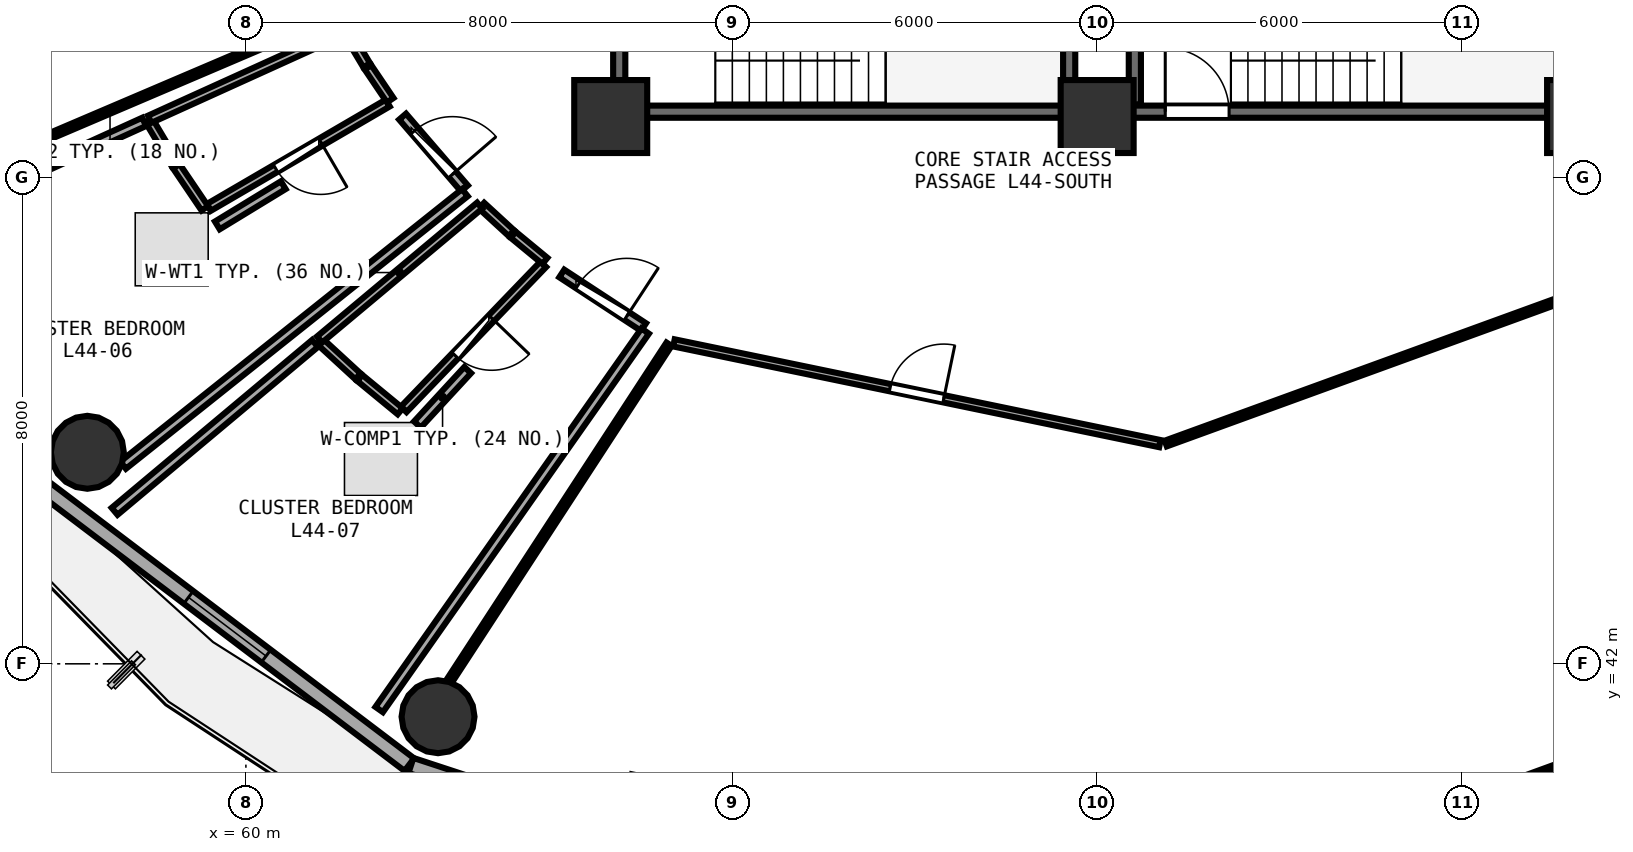
"""IFC4 building model, lengths in metres.
Left out: names, types, materials, properties, quantities, classifications, styles, units other than length and angle.
Written with IfcOpenShell. Run it as: python <this file> out.ifc"""

import sys

from ifc_helpers import new_model, si_unit, direction, frame, frame_2d, origin, origin_2d, place, context, subcontext, project, spatial, rectangle, circle, extrude, element, fill, save


model = new_model("IFC4")
c1 = context("Model", 3, precision=1e-05, world=origin(), true_north=direction((0.0, 1.0)))
c2 = subcontext(c1, "Body", "Model", "MODEL_VIEW")
j1 = project(units=[si_unit("LENGTHUNIT", "METRE"), si_unit("PLANEANGLEUNIT", "RADIAN")], contexts=[c1])
p1 = place(None, origin())
s1 = spatial("IfcSite", under=j1, at=p1, CompositionType="ELEMENT")
p2 = place(p1, origin())
s2 = spatial("IfcBuilding", under=s1, at=p2, CompositionType="ELEMENT")
p3 = place(p2, frame((0.0, 0.0, 173.1)))
s3 = spatial("IfcBuildingStorey", under=s2, at=p3, CompositionType="ELEMENT", Elevation=173.1)
for number, where, z_axis, x_axis in (
    (1, (66.0, 51.0, 0.0), (0.0, 0.0, 1.0), (1.0, 0.0, 0.0)),
    (2, (74.0, 51.0, 0.0), (0.0, 0.0, 1.0), (1.0, 0.0, 0.0)),
    (3, (82.0, 51.0, 0.0), (0.0, 0.0, 1.0), (1.0, 0.0, 0.0)),
):
    element("IfcColumn", number, at=place(p3, frame(where, z_axis=z_axis, x_axis=x_axis)), inside=s3, PredefinedType="PILASTER", context=c2, shape_type="SweptSolid", body=[
        extrude(rectangle(XDim=1.2, YDim=1.2, at=origin_2d()), origin(), (0.0, 0.0, 1.0), 3.75),
    ])
for number, where, z_axis, x_axis in (
    (4, (57.392, 45.479, 0.0), (0.0, 0.0, 1.0), (1.0, 0.0, 0.0)),
    (5, (63.16, 41.13, 0.0), (0.0, 0.0, 1.0), (1.0, 0.0, 0.0)),
):
    element("IfcColumn", number, at=place(p3, frame(where, z_axis=z_axis, x_axis=x_axis)), inside=s3, PredefinedType="COLUMN", context=c2, shape_type="SweptSolid", body=[
        extrude(circle(Radius=0.6, at=origin_2d()), origin(), (0.0, 0.0, 1.0), 3.75),
    ])
p4 = place(p3, frame((56.699, 44.878, 0.0), z_axis=(0.0, 0.0, 1.0), x_axis=(0.797163719609, -0.603763202042, 0.0)))
e6 = element("IfcWall", 6, at=p4, inside=s3, PredefinedType="SOLIDWALL", context=c2, shape_type="SweptSolid", body=[
    extrude(rectangle(XDim=7.512, YDim=0.26, at=frame_2d((3.756, 0.0))), origin(), (0.0, 0.0, 1.0), 3.475),
])
p5 = place(p4, frame((2.956, 0.0, 0.85)))
e7 = element("IfcOpeningElement", 7, at=p5, cuts=e6, PredefinedType="OPENING", context=c2, shape_type="SweptSolid", body=[
    extrude(rectangle(XDim=1.6, YDim=1.45, at=frame_2d((0.8, 0.725))), frame((0.0, 0.14, 0.0), z_axis=(0.0, -1.0, 0.0), x_axis=(1.0, 0.0, 0.0)), (0.0, 0.0, 1.0), 0.28),
])
p6 = place(p3, frame((62.714, 40.328, 0.0), z_axis=(0.0, 0.0, 1.0), x_axis=(0.950038302428, -0.312133343173, 0.0)))
e8 = element("IfcWall", 8, at=p6, inside=s3, PredefinedType="SOLIDWALL", context=c2, shape_type="SweptSolid", body=[
    extrude(rectangle(XDim=7.733, YDim=0.26, at=frame_2d((3.867, 0.0))), origin(), (0.0, 0.0, 1.0), 3.475),
])
p7 = place(p6, frame((3.067, 0.0, 0.85)))
e9 = element("IfcOpeningElement", 9, at=p7, cuts=e8, PredefinedType="OPENING", context=c2, shape_type="SweptSolid", body=[
    extrude(rectangle(XDim=1.6, YDim=1.45, at=frame_2d((0.8, 0.725))), frame((0.0, 0.14, 0.0), z_axis=(0.0, -1.0, 0.0), x_axis=(1.0, 0.0, 0.0)), (0.0, 0.0, 1.0), 0.28),
])
p8 = place(p3, frame((74.0, 51.08, 0.0), z_axis=(0.0, 0.0, 1.0), x_axis=(1.0, 0.0, 0.0)))
e10 = element("IfcWall", 10, at=p8, inside=s3, PredefinedType="SHEAR", context=c2, shape_type="SweptSolid", body=[
    extrude(rectangle(XDim=7.9, YDim=0.2, at=frame_2d((3.95, 0.0))), origin(), (0.0, 0.0, 1.0), 3.49),
])
p9 = place(p8, frame((1.12, 0.0, 0.0)))
e11 = element("IfcOpeningElement", 11, at=p9, cuts=e10, PredefinedType="OPENING", context=c2, shape_type="SweptSolid", body=[
    extrude(rectangle(XDim=1.05, YDim=2.1, at=frame_2d((0.525, 1.05))), frame((0.0, 0.11, 0.0), z_axis=(0.0, -1.0, 0.0), x_axis=(1.0, 0.0, 0.0)), (0.0, 0.0, 1.0), 0.22),
])
p10 = place(p3, frame((74.62, 54.27, 0.0), z_axis=(0.0, 0.0, 1.0), x_axis=(0.0, -1.0, 0.0)))
e12 = element("IfcWall", 12, at=p10, inside=s3, PredefinedType="SHEAR", context=c2, shape_type="SweptSolid", body=[
    extrude(rectangle(XDim=3.07, YDim=0.2, at=frame_2d((1.535, 0.0))), origin(), (0.0, 0.0, 1.0), 3.49),
])
p11 = place(p3, frame((66.26, 51.08, 0.0), z_axis=(0.0, 0.0, 1.0), x_axis=(1.0, 0.0, 0.0)))
e13 = element("IfcWall", 13, at=p11, inside=s3, PredefinedType="SHEAR", context=c2, shape_type="SweptSolid", body=[
    extrude(rectangle(XDim=7.16, YDim=0.2, at=frame_2d((3.58, 0.0))), origin(), (0.0, 0.0, 1.0), 3.49),
])
p12 = place(p3, frame((73.54, 51.2, 0.0), z_axis=(0.0, 0.0, 1.0), x_axis=(0.0, 1.0, 0.0)))
e14 = element("IfcWall", 14, at=p12, inside=s3, PredefinedType="SHEAR", context=c2, shape_type="SweptSolid", body=[
    extrude(rectangle(XDim=3.07, YDim=0.2, at=frame_2d((1.535, 0.0))), origin(), (0.0, 0.0, 1.0), 3.49),
])
p13 = place(p3, frame((66.14, 54.27, 0.0), z_axis=(0.0, 0.0, 1.0), x_axis=(0.0, -1.0, 0.0)))
e15 = element("IfcWall", 15, at=p13, inside=s3, PredefinedType="SHEAR", context=c2, shape_type="SweptSolid", body=[
    extrude(rectangle(XDim=3.07, YDim=0.2, at=frame_2d((1.535, 0.0))), origin(), (0.0, 0.0, 1.0), 3.49),
])
p14 = place(p13, frame((1.01, 0.0, 0.0)))
e16 = element("IfcOpeningElement", 16, at=p14, cuts=e15, PredefinedType="OPENING", context=c2, shape_type="SweptSolid", body=[
    extrude(rectangle(XDim=1.05, YDim=2.1, at=frame_2d((0.525, 1.05))), frame((0.0, 0.11, 0.0), z_axis=(0.0, -1.0, 0.0), x_axis=(1.0, 0.0, 0.0)), (0.0, 0.0, 1.0), 0.22),
])
p15 = place(p3, frame((67.04, 47.278, 0.0), z_axis=(0.0, 0.0, 1.0), x_axis=(0.979184226645, -0.202973521154, 0.0)))
e17 = element("IfcWall", 17, at=p15, inside=s3, PredefinedType="PARTITIONING", context=c2, shape_type="SweptSolid", body=[
    extrude(rectangle(XDim=8.162, YDim=0.12, at=frame_2d((4.081, 0.0))), origin(), (0.0, 0.0, 1.0), 2.975),
])
p16 = place(p15, frame((3.631, 0.0, 0.0)))
e18 = element("IfcOpeningElement", 18, at=p16, cuts=e17, PredefinedType="OPENING", context=c2, shape_type="SweptSolid", body=[
    extrude(rectangle(XDim=0.9, YDim=2.08, at=frame_2d((0.45, 1.04))), frame((0.0, 0.07, 0.0), z_axis=(0.0, -1.0, 0.0), x_axis=(1.0, 0.0, 0.0)), (0.0, 0.0, 1.0), 0.14),
])
p17 = place(p3, frame((62.333, 51.222, 0.0), z_axis=(0.0, 0.0, 1.0), x_axis=(-0.863869779697, -0.503715201008, 0.0)))
e19 = element("IfcWall", 19, at=p17, inside=s3, PredefinedType="PLUMBINGWALL", context=c2, shape_type="SweptSolid", body=[
    extrude(rectangle(XDim=3.41, YDim=0.13, at=frame_2d((1.705, 0.0))), origin(), (0.0, 0.0, 1.0), 2.975),
])
p18 = place(p17, frame((1.275, 0.0, 0.0)))
e20 = element("IfcOpeningElement", 20, at=p18, cuts=e19, PredefinedType="OPENING", context=c2, shape_type="SweptSolid", body=[
    extrude(rectangle(XDim=0.86, YDim=2.05, at=frame_2d((0.43, 1.025))), frame((0.0, 0.075, 0.0), z_axis=(0.0, -1.0, 0.0), x_axis=(1.0, 0.0, 0.0)), (0.0, 0.0, 1.0), 0.15),
])
p19 = place(p3, frame((62.577, 50.999, 0.0), z_axis=(0.0, 0.0, 1.0), x_axis=(0.652725635782, -0.757594379859, 0.0)))
e21 = element("IfcWall", 21, at=p19, inside=s3, PredefinedType="PARTITIONING", context=c2, shape_type="SweptSolid", body=[
    extrude(rectangle(XDim=1.557, YDim=0.15, at=frame_2d((0.779, 0.0))), origin(), (0.0, 0.0, 1.0), 2.975),
])
p20 = place(p19, frame((0.304, 0.0, 0.0)))
e22 = element("IfcOpeningElement", 22, at=p20, cuts=e21, PredefinedType="OPENING", context=c2, shape_type="SweptSolid", body=[
    extrude(rectangle(XDim=0.95, YDim=2.08, at=frame_2d((0.475, 1.04))), frame((0.0, 0.085, 0.0), z_axis=(0.0, -1.0, 0.0), x_axis=(1.0, 0.0, 0.0)), (0.0, 0.0, 1.0), 0.17),
])
p21 = place(p3, frame((64.891, 48.571, 0.0), z_axis=(0.0, 0.0, 1.0), x_axis=(-0.69341503006, -0.720538407086, 0.0)))
e23 = element("IfcWall", 23, at=p21, inside=s3, PredefinedType="PLUMBINGWALL", context=c2, shape_type="SweptSolid", body=[
    extrude(rectangle(XDim=3.312, YDim=0.13, at=frame_2d((1.656, 0.0))), origin(), (0.0, 0.0, 1.0), 3.175),
])
p22 = place(p21, frame((1.226, 0.0, 0.0)))
e24 = element("IfcOpeningElement", 24, at=p22, cuts=e23, PredefinedType="OPENING", context=c2, shape_type="SweptSolid", body=[
    extrude(rectangle(XDim=0.86, YDim=2.05, at=frame_2d((0.43, 1.025))), frame((0.0, 0.075, 0.0), z_axis=(0.0, -1.0, 0.0), x_axis=(1.0, 0.0, 0.0)), (0.0, 0.0, 1.0), 0.15),
])
p23 = place(p3, frame((65.195, 48.419, 0.0), z_axis=(0.0, 0.0, 1.0), x_axis=(0.836324272787, -0.548235087118, 0.0)))
e25 = element("IfcWall", 25, at=p23, inside=s3, PredefinedType="PARTITIONING", context=c2, shape_type="SweptSolid", body=[
    extrude(rectangle(XDim=1.608, YDim=0.15, at=frame_2d((0.804, 0.0))), origin(), (0.0, 0.0, 1.0), 2.975),
])
p24 = place(p23, frame((0.329, 0.0, 0.0)))
e26 = element("IfcOpeningElement", 26, at=p24, cuts=e25, PredefinedType="OPENING", context=c2, shape_type="SweptSolid", body=[
    extrude(rectangle(XDim=0.95, YDim=2.08, at=frame_2d((0.475, 1.04))), frame((0.0, 0.085, 0.0), z_axis=(0.0, -1.0, 0.0), x_axis=(1.0, 0.0, 0.0)), (0.0, 0.0, 1.0), 0.17),
])
p25 = place(p3, frame((75.129, 45.623, 0.0), z_axis=(0.0, 0.0, 1.0), x_axis=(0.939734662541, 0.341904612458, 0.0)))
e27 = element("IfcWall", 27, at=p25, inside=s3, PredefinedType="PARTITIONING", context=c2, shape_type="SweptSolid", body=[
    extrude(rectangle(XDim=8.13, YDim=0.1, at=frame_2d((4.065, 0.0))), origin(), (0.0, 0.0, 1.0), 2.975),
])
p26 = place(p3, frame((84.232, 41.276, 0.0), z_axis=(0.0, 0.0, 1.0), x_axis=(-0.939540154598, -0.34243875058, 0.0)))
e28 = element("IfcWall", 28, at=p26, inside=s3, PredefinedType="PARTITIONING", context=c2, shape_type="SweptSolid", body=[
    extrude(rectangle(XDim=5.015, YDim=0.1, at=frame_2d((2.507, 0.0))), origin(), (0.0, 0.0, 1.0), 3.025),
])
p27 = place(p3, frame((63.351, 41.725, 0.0), z_axis=(0.0, 0.0, 1.0), x_axis=(0.546294843463, 0.837592946487, 0.0)))
e29 = element("IfcWall", 29, at=p27, inside=s3, PredefinedType="PARTITIONING", context=c2, shape_type="SweptSolid", body=[
    extrude(rectangle(XDim=6.604, YDim=0.1, at=frame_2d((3.302, 0.0))), origin(), (0.0, 0.0, 1.0), 2.975),
])
p28 = place(p3, frame((61.458, 52.675, 0.0), z_axis=(0.0, 0.0, 1.0), x_axis=(-0.919801141081, -0.392384837713, 0.0)))
e30 = element("IfcWall", 30, at=p28, inside=s3, PredefinedType="PARTITIONING", context=c2, shape_type="SweptSolid", body=[
    extrude(rectangle(XDim=8.03, YDim=0.1, at=frame_2d((4.015, 0.0))), origin(), (0.0, 0.0, 1.0), 2.975),
])
p29 = place(p3, frame((61.653, 52.401, 0.0), z_axis=(0.0, 0.0, 1.0), x_axis=(0.513279564627, -0.858221468233, 0.0)))
e31 = element("IfcWall", 31, at=p29, inside=s3, PredefinedType="PLUMBINGWALL", context=c2, shape_type="SweptSolid", body=[
    extrude(rectangle(XDim=0.65, YDim=0.13, at=frame_2d((0.325, 0.0))), origin(), (0.0, 0.0, 1.0), 3.48),
])
p30 = place(p3, frame((62.008, 51.809, 0.0), z_axis=(0.0, 0.0, 1.0), x_axis=(0.559954578189, -0.828523307074, 0.0)))
e32 = element("IfcWall", 32, at=p30, inside=s3, PredefinedType="PLUMBINGWALL", context=c2, shape_type="SweptSolid", body=[
    extrude(rectangle(XDim=0.653, YDim=0.13, at=frame_2d((0.326, 0.0))), origin(), (0.0, 0.0, 1.0), 2.975),
])
p31 = place(p3, frame((59.325, 49.49, 0.0), z_axis=(0.0, 0.0, 1.0), x_axis=(-0.560686624686, 0.828028084607, 0.0)))
e33 = element("IfcWall", 33, at=p31, inside=s3, PredefinedType="PLUMBINGWALL", context=c2, shape_type="SweptSolid", body=[
    extrude(rectangle(XDim=0.836, YDim=0.13, at=frame_2d((0.418, 0.0))), origin(), (0.0, 0.0, 1.0), 3.48),
])
p32 = place(p3, frame((58.835, 50.216, 0.0), z_axis=(0.0, 0.0, 1.0), x_axis=(-0.512289710711, 0.858812699196, 0.0)))
e34 = element("IfcWall", 34, at=p32, inside=s3, PredefinedType="PLUMBINGWALL", context=c2, shape_type="SweptSolid", body=[
    extrude(rectangle(XDim=0.831, YDim=0.13, at=frame_2d((0.415, 0.0))), origin(), (0.0, 0.0, 1.0), 3.48),
])
p33 = place(p3, frame((58.417, 50.955, 0.0), z_axis=(0.0, 0.0, 1.0), x_axis=(0.910753048359, 0.412951431654, 0.0)))
e35 = element("IfcWall", 35, at=p33, inside=s3, PredefinedType="PLUMBINGWALL", context=c2, shape_type="SweptSolid", body=[
    extrude(rectangle(XDim=3.522, YDim=0.13, at=frame_2d((1.761, 0.0))), origin(), (0.0, 0.0, 1.0), 2.975),
])
p34 = place(p3, frame((63.602, 49.748, 0.0), z_axis=(0.0, 0.0, 1.0), x_axis=(-0.781921185322, -0.623377301435, 0.0)))
e36 = element("IfcWall", 36, at=p34, inside=s3, PredefinedType="PARTITIONING", context=c2, shape_type="SweptSolid", body=[
    extrude(rectangle(XDim=7.19, YDim=0.15, at=frame_2d((3.595, 0.0))), origin(), (0.0, 0.0, 1.0), 2.975),
])
p35 = place(p3, frame((54.308, 49.088, 0.0), z_axis=(0.0, 0.0, 1.0), x_axis=(0.910561522486, 0.413373576524, 0.0)))
e37 = element("IfcWall", 37, at=p35, inside=s3, PredefinedType="PARTITIONING", context=c2, shape_type="SweptSolid", body=[
    extrude(rectangle(XDim=4.413, YDim=0.15, at=frame_2d((2.207, 0.0))), origin(), (0.0, 0.0, 1.0), 3.025),
])
p36 = place(p3, frame((59.53, 49.21, 0.0), z_axis=(0.0, 0.0, 1.0), x_axis=(0.853704464487, 0.520757801012, 0.0)))
e38 = element("IfcWall", 38, at=p36, inside=s3, PredefinedType="PARTITIONING", context=c2, shape_type="SweptSolid", body=[
    extrude(rectangle(XDim=1.27, YDim=0.15, at=frame_2d((0.635, 0.0))), origin(), (0.0, 0.0, 1.0), 3.175),
])
p37 = place(p3, frame((63.875, 49.534, 0.0), z_axis=(0.0, 0.0, 1.0), x_axis=(0.736047371117, -0.676930031444, 0.0)))
e39 = element("IfcWall", 39, at=p37, inside=s3, PredefinedType="PLUMBINGWALL", context=c2, shape_type="SweptSolid", body=[
    extrude(rectangle(XDim=0.669, YDim=0.13, at=frame_2d((0.334, 0.0))), origin(), (0.0, 0.0, 1.0), 2.975),
])
p38 = place(p3, frame((64.397, 49.055, 0.0), z_axis=(0.0, 0.0, 1.0), x_axis=(0.771595512941, -0.636113483908, 0.0)))
e40 = element("IfcWall", 40, at=p38, inside=s3, PredefinedType="PLUMBINGWALL", context=c2, shape_type="SweptSolid", body=[
    extrude(rectangle(XDim=0.674, YDim=0.13, at=frame_2d((0.337, 0.0))), origin(), (0.0, 0.0, 1.0), 3.48),
])
p39 = place(p3, frame((62.538, 46.154, 0.0), z_axis=(0.0, 0.0, 1.0), x_axis=(-0.772085608201, 0.635518539154, 0.0)))
e41 = element("IfcWall", 41, at=p39, inside=s3, PredefinedType="PLUMBINGWALL", context=c2, shape_type="SweptSolid", body=[
    extrude(rectangle(XDim=0.862, YDim=0.13, at=frame_2d((0.431, 0.0))), origin(), (0.0, 0.0, 1.0), 3.175),
])
p40 = place(p3, frame((61.842, 46.728, 0.0), z_axis=(0.0, 0.0, 1.0), x_axis=(-0.735982119843, 0.67700097435, 0.0)))
e42 = element("IfcWall", 42, at=p40, inside=s3, PredefinedType="PLUMBINGWALL", context=c2, shape_type="SweptSolid", body=[
    extrude(rectangle(XDim=0.857, YDim=0.13, at=frame_2d((0.428, 0.0))), origin(), (0.0, 0.0, 1.0), 3.175),
])
p41 = place(p3, frame((61.212, 47.334, 0.0), z_axis=(0.0, 0.0, 1.0), x_axis=(0.767100423645, 0.641527037656, 0.0)))
e43 = element("IfcWall", 43, at=p41, inside=s3, PredefinedType="PLUMBINGWALL", context=c2, shape_type="SweptSolid", body=[
    extrude(rectangle(XDim=3.432, YDim=0.13, at=frame_2d((1.716, 0.0))), origin(), (0.0, 0.0, 1.0), 2.975),
])
p42 = place(p3, frame((66.567, 47.472, 0.0), z_axis=(0.0, 0.0, 1.0), x_axis=(-0.575029116879, -0.818132944417, 0.0)))
e44 = element("IfcWall", 44, at=p42, inside=s3, PredefinedType="PARTITIONING", context=c2, shape_type="SweptSolid", body=[
    extrude(rectangle(XDim=7.608, YDim=0.15, at=frame_2d((3.804, 0.0))), origin(), (0.0, 0.0, 1.0), 2.975),
])
p43 = place(p3, frame((57.841, 44.508, 0.0), z_axis=(0.0, 0.0, 1.0), x_axis=(0.766673820116, 0.642036800774, 0.0)))
e45 = element("IfcWall", 45, at=p43, inside=s3, PredefinedType="PARTITIONING", context=c2, shape_type="SweptSolid", body=[
    extrude(rectangle(XDim=4.3, YDim=0.15, at=frame_2d((2.15, 0.0))), origin(), (0.0, 0.0, 1.0), 3.025),
])
p44 = place(p3, frame((62.821, 45.935, 0.0), z_axis=(0.0, 0.0, 1.0), x_axis=(0.678404878428, 0.734688247439, 0.0)))
e46 = element("IfcWall", 46, at=p44, inside=s3, PredefinedType="PARTITIONING", context=c2, shape_type="SweptSolid", body=[
    extrude(rectangle(XDim=1.219, YDim=0.15, at=frame_2d((0.609, 0.0))), origin(), (0.0, 0.0, 1.0), 3.175),
])
p45 = place(p5, origin())
e47 = element("IfcWindow", 47, at=p45, inside=s3, PartitioningType="SINGLE_PANEL", PredefinedType="WINDOW", context=c2, shape_type="SweptSolid", body=[
    extrude(rectangle(XDim=1.6, YDim=1.45, at=frame_2d((0.8, 0.725))), frame((0.0, 0.03, 0.0), z_axis=(0.0, -1.0, 0.0), x_axis=(1.0, 0.0, 0.0)), (0.0, 0.0, 1.0), 0.06),
])
fill(e7, e47)
p46 = place(p9, origin())
e48 = element("IfcDoor", 48, at=p46, inside=s3, OperationType="SINGLE_SWING_LEFT", PredefinedType="DOOR", context=c2, shape_type="SweptSolid", body=[
    extrude(rectangle(XDim=1.05, YDim=2.1, at=frame_2d((0.525, 1.05))), frame((0.0, 0.025, 0.0), z_axis=(0.0, -1.0, 0.0), x_axis=(1.0, 0.0, 0.0)), (0.0, 0.0, 1.0), 0.05),
])
fill(e11, e48)
p47 = place(p16, origin())
e49 = element("IfcDoor", 49, at=p47, inside=s3, OperationType="SINGLE_SWING_RIGHT", PredefinedType="DOOR", context=c2, shape_type="SweptSolid", body=[
    extrude(rectangle(XDim=0.9, YDim=2.08, at=frame_2d((0.45, 1.04))), frame((0.0, 0.025, 0.0), z_axis=(0.0, -1.0, 0.0), x_axis=(1.0, 0.0, 0.0)), (0.0, 0.0, 1.0), 0.05),
])
fill(e18, e49)
p48 = place(p18, origin())
e50 = element("IfcDoor", 50, at=p48, inside=s3, OperationType="SINGLE_SWING_LEFT", PredefinedType="DOOR", context=c2, shape_type="SweptSolid", body=[
    extrude(rectangle(XDim=0.86, YDim=2.05, at=frame_2d((0.43, 1.025))), frame((0.0, 0.025, 0.0), z_axis=(0.0, -1.0, 0.0), x_axis=(1.0, 0.0, 0.0)), (0.0, 0.0, 1.0), 0.05),
])
fill(e20, e50)
p49 = place(p20, origin())
e51 = element("IfcDoor", 51, at=p49, inside=s3, OperationType="SINGLE_SWING_RIGHT", PredefinedType="DOOR", context=c2, shape_type="SweptSolid", body=[
    extrude(rectangle(XDim=0.95, YDim=2.08, at=frame_2d((0.475, 1.04))), frame((0.0, 0.025, 0.0), z_axis=(0.0, -1.0, 0.0), x_axis=(1.0, 0.0, 0.0)), (0.0, 0.0, 1.0), 0.05),
])
fill(e22, e51)
p50 = place(p22, origin())
e52 = element("IfcDoor", 52, at=p50, inside=s3, OperationType="SINGLE_SWING_LEFT", PredefinedType="DOOR", context=c2, shape_type="SweptSolid", body=[
    extrude(rectangle(XDim=0.86, YDim=2.05, at=frame_2d((0.43, 1.025))), frame((0.0, 0.025, 0.0), z_axis=(0.0, -1.0, 0.0), x_axis=(1.0, 0.0, 0.0)), (0.0, 0.0, 1.0), 0.05),
])
fill(e24, e52)
p51 = place(p24, origin())
e53 = element("IfcDoor", 53, at=p51, inside=s3, OperationType="SINGLE_SWING_RIGHT", PredefinedType="DOOR", context=c2, shape_type="SweptSolid", body=[
    extrude(rectangle(XDim=0.95, YDim=2.08, at=frame_2d((0.475, 1.04))), frame((0.0, 0.025, 0.0), z_axis=(0.0, -1.0, 0.0), x_axis=(1.0, 0.0, 0.0)), (0.0, 0.0, 1.0), 0.05),
])
fill(e26, e53)
save(model, sys.argv[1])
